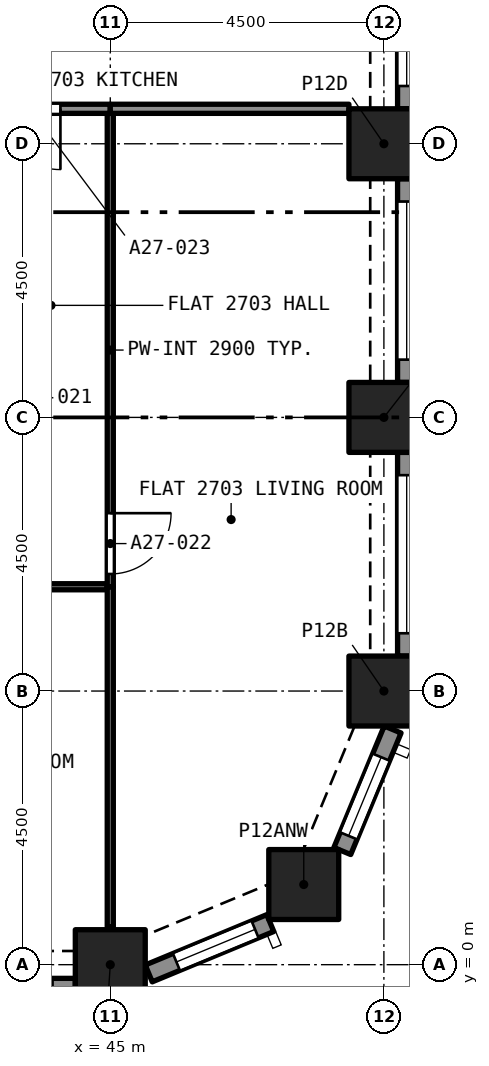
"""IFC4 building model, lengths in metres.
Left out: names, types, materials, properties, quantities, classifications, styles, units other than length and angle.
Written with IfcOpenShell. Run it as: python <this file> out.ifc"""

import sys

from ifc_helpers import new_model, si_unit, direction, frame, frame_2d, origin, origin_2d, place, context, subcontext, project, spatial, rectangle, extrude, element, fill, save


model = new_model("IFC4")
c1 = context("Model", 3, precision=1e-05, world=origin(), true_north=direction((0.0, 1.0)))
c2 = subcontext(c1, "Body", "Model", "MODEL_VIEW")
j1 = project(units=[si_unit("LENGTHUNIT", "METRE"), si_unit("PLANEANGLEUNIT", "RADIAN")], contexts=[c1])
p1 = place(None, origin())
s1 = spatial("IfcSite", under=j1, at=p1, CompositionType="ELEMENT")
p2 = place(p1, origin())
s2 = spatial("IfcBuilding", under=s1, at=p2, CompositionType="ELEMENT")
p3 = place(p2, frame((0.0, 0.0, 99.2)))
s3 = spatial("IfcBuildingStorey", under=s2, at=p3, CompositionType="ELEMENT", Elevation=99.2)
for number, where, z_axis, x_axis in (
    (1, (45.0, 0.0, 0.0), (0.0, 0.0, 1.0), (1.0, 0.0, 0.0)),
    (2, (48.182, 1.318, 0.0), (0.0, 0.0, 1.0), (1.0, 0.0, 0.0)),
    (3, (49.5, 4.5, 0.0), (0.0, 0.0, 1.0), (1.0, 0.0, 0.0)),
    (4, (49.5, 9.0, 0.0), (0.0, 0.0, 1.0), (1.0, 0.0, 0.0)),
    (5, (49.5, 13.5, 0.0), (0.0, 0.0, 1.0), (1.0, 0.0, 0.0)),
):
    element("IfcColumn", number, at=place(p3, frame(where, z_axis=z_axis, x_axis=x_axis)), inside=s3, PredefinedType="COLUMN", context=c2, shape_type="SweptSolid", body=[
        extrude(rectangle(XDim=1.15, YDim=1.15, at=origin_2d()), origin(), (0.0, 0.0, 1.0), 3.2),
    ])
p4 = place(p3, frame((44.425, -0.375, 0.0), z_axis=(0.0, 0.0, 1.0), x_axis=(-1.0, 0.0, 0.0)))
e6 = element("IfcWall", 6, at=p4, inside=s3, PredefinedType="SOLIDWALL", context=c2, shape_type="SweptSolid", body=[
    extrude(rectangle(XDim=3.35, YDim=0.3, at=frame_2d((1.675, 0.0))), origin(), (0.0, 0.0, 1.0), 3.2),
])
p5 = place(p4, frame((0.375, 0.0, 0.45)))
e7 = element("IfcOpeningElement", 7, at=p5, cuts=e6, PredefinedType="OPENING", context=c2, shape_type="SweptSolid", body=[
    extrude(rectangle(XDim=2.6, YDim=1.95, at=frame_2d((1.3, 0.975))), frame((0.0, 0.16, 0.0), z_axis=(0.0, -1.0, 0.0), x_axis=(1.0, 0.0, 0.0)), (0.0, 0.0, 1.0), 0.32),
])
p6 = place(p3, frame((47.631, 0.684, 0.0), z_axis=(0.0, 0.0, 1.0), x_axis=(-0.923862802911, -0.382723818695, 0.0)))
e8 = element("IfcWall", 8, at=p6, inside=s3, PredefinedType="SOLIDWALL", context=c2, shape_type="SweptSolid", body=[
    extrude(rectangle(XDim=2.164, YDim=0.3, at=frame_2d((1.082, 0.0))), origin(), (0.0, 0.0, 1.0), 3.2),
])
p7 = place(p6, frame((0.271, 0.0, 0.45)))
e9 = element("IfcOpeningElement", 9, at=p7, cuts=e8, PredefinedType="OPENING", context=c2, shape_type="SweptSolid", body=[
    extrude(rectangle(XDim=1.4, YDim=1.95, at=frame_2d((0.7, 0.975))), frame((0.0, 0.16, 0.0), z_axis=(0.0, -1.0, 0.0), x_axis=(1.0, 0.0, 0.0)), (0.0, 0.0, 1.0), 0.32),
])
p8 = place(p3, frame((49.644, 3.868, 0.0), z_axis=(0.0, 0.0, 1.0), x_axis=(-0.382723818695, -0.923862802911, 0.0)))
e10 = element("IfcWall", 10, at=p8, inside=s3, PredefinedType="SOLIDWALL", context=c2, shape_type="SweptSolid", body=[
    extrude(rectangle(XDim=2.164, YDim=0.3, at=frame_2d((1.082, 0.0))), origin(), (0.0, 0.0, 1.0), 3.2),
])
p9 = place(p8, frame((0.493, 0.0, 0.45)))
e11 = element("IfcOpeningElement", 11, at=p9, cuts=e10, PredefinedType="OPENING", context=c2, shape_type="SweptSolid", body=[
    extrude(rectangle(XDim=1.4, YDim=1.95, at=frame_2d((0.7, 0.975))), frame((0.0, 0.16, 0.0), z_axis=(0.0, -1.0, 0.0), x_axis=(1.0, 0.0, 0.0)), (0.0, 0.0, 1.0), 0.32),
])
p10 = place(p3, frame((49.875, 8.425, 0.0), z_axis=(0.0, 0.0, 1.0), x_axis=(0.0, -1.0, 0.0)))
e12 = element("IfcWall", 12, at=p10, inside=s3, PredefinedType="SOLIDWALL", context=c2, shape_type="SweptSolid", body=[
    extrude(rectangle(XDim=3.35, YDim=0.3, at=frame_2d((1.675, 0.0))), origin(), (0.0, 0.0, 1.0), 3.2),
])
p11 = place(p10, frame((0.375, 0.0, 0.45)))
e13 = element("IfcOpeningElement", 13, at=p11, cuts=e12, PredefinedType="OPENING", context=c2, shape_type="SweptSolid", body=[
    extrude(rectangle(XDim=2.6, YDim=1.95, at=frame_2d((1.3, 0.975))), frame((0.0, 0.16, 0.0), z_axis=(0.0, -1.0, 0.0), x_axis=(1.0, 0.0, 0.0)), (0.0, 0.0, 1.0), 0.32),
])
p12 = place(p3, frame((49.875, 12.925, 0.0), z_axis=(0.0, 0.0, 1.0), x_axis=(0.0, -1.0, 0.0)))
e14 = element("IfcWall", 14, at=p12, inside=s3, PredefinedType="SOLIDWALL", context=c2, shape_type="SweptSolid", body=[
    extrude(rectangle(XDim=3.35, YDim=0.3, at=frame_2d((1.675, 0.0))), origin(), (0.0, 0.0, 1.0), 3.2),
])
p13 = place(p12, frame((0.375, 0.0, 0.45)))
e15 = element("IfcOpeningElement", 15, at=p13, cuts=e14, PredefinedType="OPENING", context=c2, shape_type="SweptSolid", body=[
    extrude(rectangle(XDim=2.6, YDim=1.95, at=frame_2d((1.3, 0.975))), frame((0.0, 0.16, 0.0), z_axis=(0.0, -1.0, 0.0), x_axis=(1.0, 0.0, 0.0)), (0.0, 0.0, 1.0), 0.32),
])
p14 = place(p3, frame((49.875, 17.425, 0.0), z_axis=(0.0, 0.0, 1.0), x_axis=(0.0, -1.0, 0.0)))
e16 = element("IfcWall", 16, at=p14, inside=s3, PredefinedType="SOLIDWALL", context=c2, shape_type="SweptSolid", body=[
    extrude(rectangle(XDim=3.35, YDim=0.3, at=frame_2d((1.675, 0.0))), origin(), (0.0, 0.0, 1.0), 3.2),
])
p15 = place(p14, frame((0.375, 0.0, 0.45)))
e17 = element("IfcOpeningElement", 17, at=p15, cuts=e16, PredefinedType="OPENING", context=c2, shape_type="SweptSolid", body=[
    extrude(rectangle(XDim=2.6, YDim=1.95, at=frame_2d((1.3, 0.975))), frame((0.0, 0.16, 0.0), z_axis=(0.0, -1.0, 0.0), x_axis=(1.0, 0.0, 0.0)), (0.0, 0.0, 1.0), 0.32),
])
p16 = place(p3, frame((44.95, 6.215, 0.0), z_axis=(0.0, 0.0, 1.0), x_axis=(-1.0, 0.0, 0.0)))
e18 = element("IfcWall", 18, at=p16, inside=s3, PredefinedType="PARTITIONING", context=c2, shape_type="SweptSolid", body=[
    extrude(rectangle(XDim=4.35, YDim=0.1, at=frame_2d((2.175, 0.0))), origin(), (0.0, 0.0, 1.0), 2.9),
])
p17 = place(p16, frame((1.75, 0.0, 0.0)))
e19 = element("IfcOpeningElement", 19, at=p17, cuts=e18, PredefinedType="OPENING", context=c2, shape_type="SweptSolid", body=[
    extrude(rectangle(XDim=0.9, YDim=2.1, at=frame_2d((0.45, 1.05))), frame((0.0, 0.06, 0.0), z_axis=(0.0, -1.0, 0.0), x_axis=(1.0, 0.0, 0.0)), (0.0, 0.0, 1.0), 0.12),
])
p18 = place(p3, frame((45.0, 0.622, 0.0), z_axis=(0.0, 0.0, 1.0), x_axis=(0.0, 1.0, 0.0)))
e20 = element("IfcWall", 20, at=p18, inside=s3, PredefinedType="PARTITIONING", context=c2, shape_type="SweptSolid", body=[
    extrude(rectangle(XDim=5.593, YDim=0.1, at=frame_2d((2.796, 0.0))), origin(), (0.0, 0.0, 1.0), 2.9),
])
p19 = place(p3, frame((45.0, 14.0, 0.0), z_axis=(0.0, 0.0, 1.0), x_axis=(0.0, -1.0, 0.0)))
e21 = element("IfcWall", 21, at=p19, inside=s3, PredefinedType="PARTITIONING", context=c2, shape_type="SweptSolid", body=[
    extrude(rectangle(XDim=7.785, YDim=0.1, at=frame_2d((3.893, 0.0))), origin(), (0.0, 0.0, 1.0), 2.9),
])
p20 = place(p19, frame((6.575, 0.0, 0.0)))
e22 = element("IfcOpeningElement", 22, at=p20, cuts=e21, PredefinedType="OPENING", context=c2, shape_type="SweptSolid", body=[
    extrude(rectangle(XDim=1.0, YDim=2.1, at=frame_2d((0.5, 1.05))), frame((0.0, 0.06, 0.0), z_axis=(0.0, -1.0, 0.0), x_axis=(1.0, 0.0, 0.0)), (0.0, 0.0, 1.0), 0.12),
])
p21 = place(p3, frame((45.0, 14.075, 0.0), z_axis=(0.0, 0.0, 1.0), x_axis=(-1.0, 0.0, 0.0)))
e23 = element("IfcWall", 23, at=p21, inside=s3, PredefinedType="PARTITIONING", context=c2, shape_type="SweptSolid", body=[
    extrude(rectangle(XDim=1.95, YDim=0.15, at=frame_2d((0.975, 0.0))), origin(), (0.0, 0.0, 1.0), 2.9),
])
p22 = place(p21, frame((0.82, 0.0, 0.0)))
e24 = element("IfcOpeningElement", 24, at=p22, cuts=e23, PredefinedType="OPENING", context=c2, shape_type="SweptSolid", body=[
    extrude(rectangle(XDim=1.0, YDim=2.1, at=frame_2d((0.5, 1.05))), frame((0.0, 0.085, 0.0), z_axis=(0.0, -1.0, 0.0), x_axis=(1.0, 0.0, 0.0)), (0.0, 0.0, 1.0), 0.17),
])
p23 = place(p3, frame((45.0, 14.075, 0.0), z_axis=(0.0, 0.0, 1.0), x_axis=(1.0, 0.0, 0.0)))
e25 = element("IfcWall", 25, at=p23, inside=s3, PredefinedType="PARTITIONING", context=c2, shape_type="SweptSolid", body=[
    extrude(rectangle(XDim=3.925, YDim=0.15, at=frame_2d((1.962, 0.0))), origin(), (0.0, 0.0, 1.0), 2.9),
])
p24 = place(p7, origin())
e26 = element("IfcWindow", 26, at=p24, inside=s3, PartitioningType="SINGLE_PANEL", PredefinedType="WINDOW", context=c2, shape_type="SweptSolid", body=[
    extrude(rectangle(XDim=1.4, YDim=1.95, at=frame_2d((0.7, 0.975))), frame((0.0, 0.03, 0.0), z_axis=(0.0, -1.0, 0.0), x_axis=(1.0, 0.0, 0.0)), (0.0, 0.0, 1.0), 0.06),
])
fill(e9, e26)
p25 = place(p9, origin())
e27 = element("IfcWindow", 27, at=p25, inside=s3, PartitioningType="SINGLE_PANEL", PredefinedType="WINDOW", context=c2, shape_type="SweptSolid", body=[
    extrude(rectangle(XDim=1.4, YDim=1.95, at=frame_2d((0.7, 0.975))), frame((0.0, 0.03, 0.0), z_axis=(0.0, -1.0, 0.0), x_axis=(1.0, 0.0, 0.0)), (0.0, 0.0, 1.0), 0.06),
])
fill(e11, e27)
p26 = place(p11, origin())
e28 = element("IfcWindow", 28, at=p26, inside=s3, PartitioningType="SINGLE_PANEL", PredefinedType="WINDOW", context=c2, shape_type="SweptSolid", body=[
    extrude(rectangle(XDim=2.6, YDim=1.95, at=frame_2d((1.3, 0.975))), frame((0.0, 0.03, 0.0), z_axis=(0.0, -1.0, 0.0), x_axis=(1.0, 0.0, 0.0)), (0.0, 0.0, 1.0), 0.06),
])
fill(e13, e28)
p27 = place(p13, origin())
e29 = element("IfcWindow", 29, at=p27, inside=s3, PartitioningType="SINGLE_PANEL", PredefinedType="WINDOW", context=c2, shape_type="SweptSolid", body=[
    extrude(rectangle(XDim=2.6, YDim=1.95, at=frame_2d((1.3, 0.975))), frame((0.0, 0.03, 0.0), z_axis=(0.0, -1.0, 0.0), x_axis=(1.0, 0.0, 0.0)), (0.0, 0.0, 1.0), 0.06),
])
fill(e15, e29)
p28 = place(p15, origin())
e30 = element("IfcWindow", 30, at=p28, inside=s3, PartitioningType="SINGLE_PANEL", PredefinedType="WINDOW", context=c2, shape_type="SweptSolid", body=[
    extrude(rectangle(XDim=2.6, YDim=1.95, at=frame_2d((1.3, 0.975))), frame((0.0, 0.03, 0.0), z_axis=(0.0, -1.0, 0.0), x_axis=(1.0, 0.0, 0.0)), (0.0, 0.0, 1.0), 0.06),
])
fill(e17, e30)
p29 = place(p20, origin())
e31 = element("IfcDoor", 31, at=p29, inside=s3, OperationType="SINGLE_SWING_RIGHT", PredefinedType="DOOR", context=c2, shape_type="SweptSolid", body=[
    extrude(rectangle(XDim=1.0, YDim=2.1, at=frame_2d((0.5, 1.05))), frame((0.0, 0.025, 0.0), z_axis=(0.0, -1.0, 0.0), x_axis=(1.0, 0.0, 0.0)), (0.0, 0.0, 1.0), 0.05),
])
fill(e22, e31)
p30 = place(p22, origin())
e32 = element("IfcDoor", 32, at=p30, inside=s3, OperationType="SINGLE_SWING_RIGHT", PredefinedType="DOOR", context=c2, shape_type="SweptSolid", body=[
    extrude(rectangle(XDim=1.0, YDim=2.1, at=frame_2d((0.5, 1.05))), frame((0.0, 0.025, 0.0), z_axis=(0.0, -1.0, 0.0), x_axis=(1.0, 0.0, 0.0)), (0.0, 0.0, 1.0), 0.05),
])
fill(e24, e32)
save(model, sys.argv[1])
